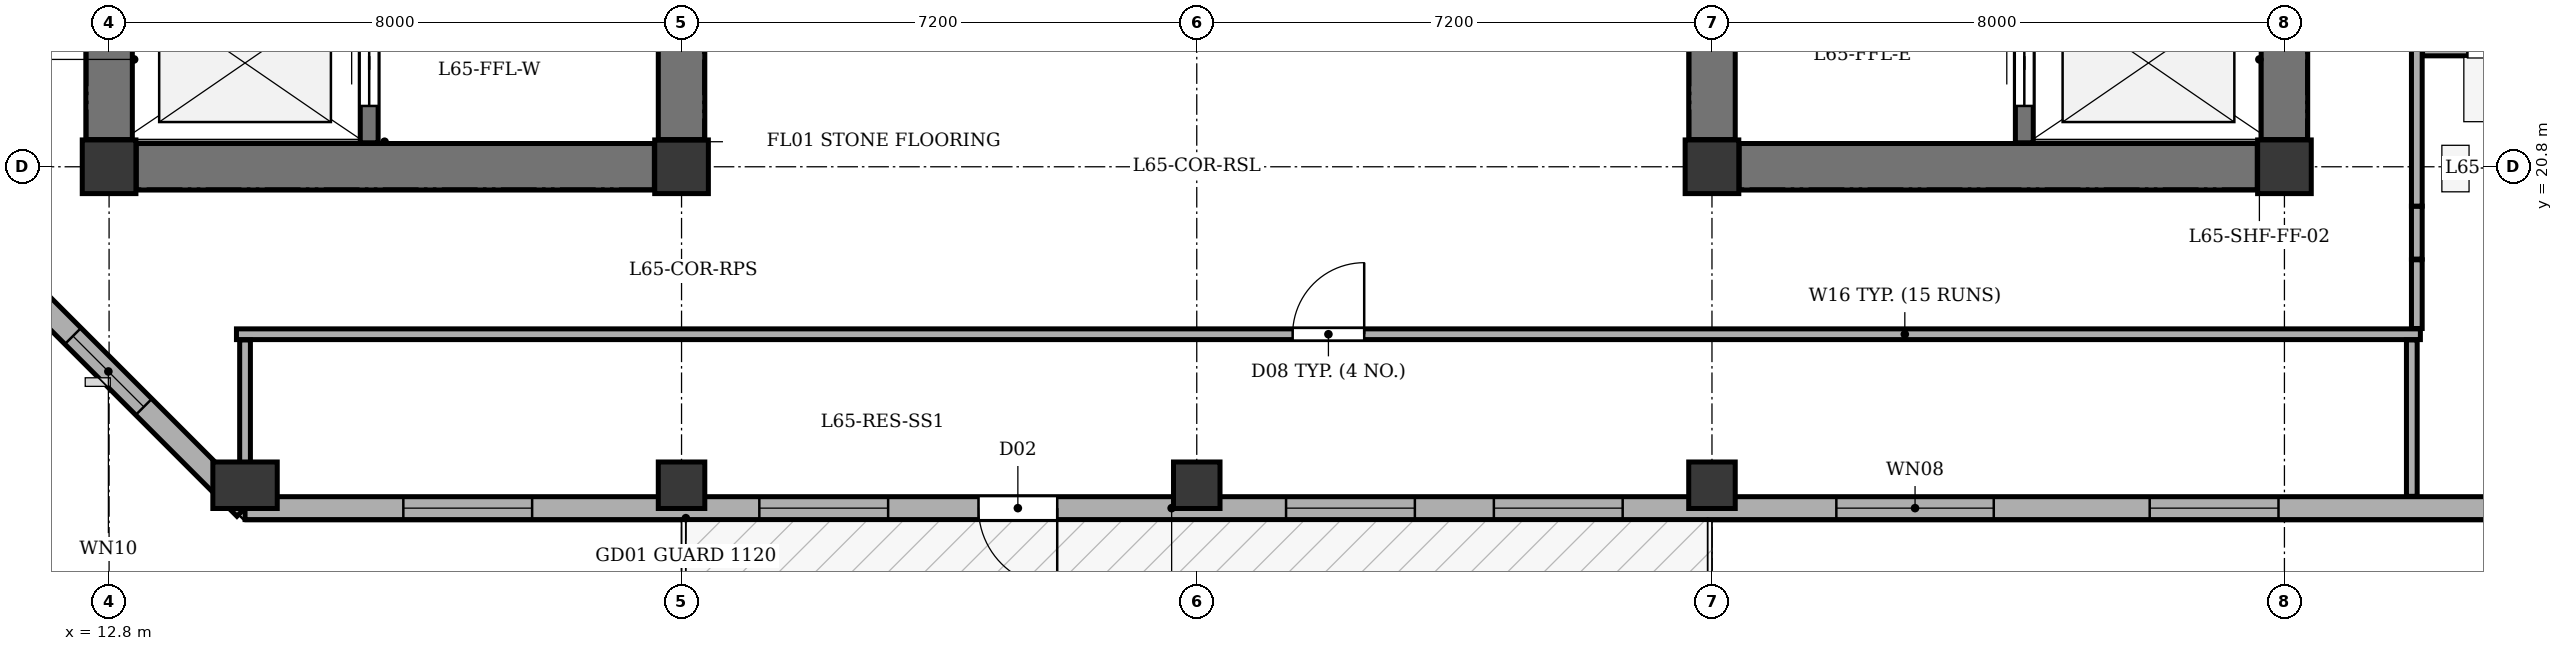
"""IFC4 building model, lengths in metres.
Left out: names, types, materials, properties, quantities, classifications, styles, units other than length and angle.
Written with IfcOpenShell. Run it as: python <this file> out.ifc"""

import sys

from ifc_helpers import new_model, si_unit, direction, frame, frame_2d, origin, origin_2d, place, context, subcontext, project, spatial, rectangle, extrude, element, fill, save


model = new_model("IFC4")
c1 = context("Model", 3, precision=1e-05, world=origin(), true_north=direction((0.0, 1.0)))
c2 = subcontext(c1, "Body", "Model", "MODEL_VIEW")
j1 = project(units=[si_unit("LENGTHUNIT", "METRE"), si_unit("PLANEANGLEUNIT", "RADIAN")], contexts=[c1])
p1 = place(None, origin())
s1 = spatial("IfcSite", under=j1, at=p1, CompositionType="ELEMENT")
p2 = place(p1, origin())
s2 = spatial("IfcBuilding", under=s1, at=p2, CompositionType="ELEMENT")
p3 = place(p2, frame((0.0, 0.0, 248.3)))
s3 = spatial("IfcBuildingStorey", under=s2, at=p3, CompositionType="ELEMENT", Elevation=248.3)
for number, where, z_axis, x_axis in (
    (1, (12.8, 20.8, 0.0), (0.0, 0.0, 1.0), (1.0, 0.0, 0.0)),
    (2, (20.8, 20.8, 0.0), (0.0, 0.0, 1.0), (1.0, 0.0, 0.0)),
    (3, (35.2, 20.8, 0.0), (0.0, 0.0, 1.0), (1.0, 0.0, 0.0)),
    (4, (43.2, 20.8, 0.0), (0.0, 0.0, 1.0), (1.0, 0.0, 0.0)),
):
    element("IfcColumn", number, at=place(p3, frame(where, z_axis=z_axis, x_axis=x_axis)), inside=s3, PredefinedType="COLUMN", context=c2, shape_type="SweptSolid", body=[
        extrude(rectangle(XDim=0.75, YDim=0.75, at=origin_2d()), origin(), (0.0, 0.0, 1.0), 3.4),
    ])
p4 = place(p3, frame((14.7, 16.35, 0.0), z_axis=(0.0, 0.0, 1.0), x_axis=(1.0, 0.0, 0.0)))
e5 = element("IfcColumn", 5, at=p4, inside=s3, PredefinedType="COLUMN", context=c2, shape_type="SweptSolid", body=[
    extrude(rectangle(XDim=0.65, YDim=0.9, at=origin_2d()), origin(), (0.0, 0.0, 1.0), 3.4),
])
for number, where, z_axis, x_axis in (
    (6, (20.8, 16.35, 0.0), (0.0, 0.0, 1.0), (1.0, 0.0, 0.0)),
    (7, (28.0, 16.35, 0.0), (0.0, 0.0, 1.0), (1.0, 0.0, 0.0)),
    (8, (35.2, 16.35, 0.0), (0.0, 0.0, 1.0), (1.0, 0.0, 0.0)),
):
    element("IfcColumn", number, at=place(p3, frame(where, z_axis=z_axis, x_axis=x_axis)), inside=s3, PredefinedType="COLUMN", context=c2, shape_type="SweptSolid", body=[
        extrude(rectangle(XDim=0.65, YDim=0.65, at=origin_2d()), origin(), (0.0, 0.0, 1.0), 3.4),
    ])
p5 = place(p3, frame((51.7, 16.03, 0.0), z_axis=(0.0, 0.0, 1.0), x_axis=(-1.0, 0.0, 0.0)))
e9 = element("IfcWall", 9, at=p5, inside=s3, PredefinedType="STANDARD", context=c2, shape_type="SweptSolid", body=[
    extrude(rectangle(XDim=37.0, YDim=0.32, at=frame_2d((18.5, 0.0))), origin(), (0.0, 0.0, 1.0), 2.725),
])
p6 = place(p5, frame((25.65, 0.0, 0.0)))
e10 = element("IfcOpeningElement", 10, at=p6, cuts=e9, PredefinedType="OPENING", context=c2, shape_type="SweptSolid", body=[
    extrude(rectangle(XDim=1.1, YDim=2.05, at=frame_2d((0.55, 1.025))), frame((0.0, 0.17, 0.0), z_axis=(0.0, -1.0, 0.0), x_axis=(1.0, 0.0, 0.0)), (0.0, 0.0, 1.0), 0.34),
])
p7 = place(p5, frame((1.235, 0.0, 0.75)))
e11 = element("IfcOpeningElement", 11, at=p7, cuts=e9, PredefinedType="OPENING", context=c2, shape_type="SweptSolid", body=[
    extrude(rectangle(XDim=1.8, YDim=1.7, at=frame_2d((0.9, 0.85))), frame((0.0, 0.17, 0.0), z_axis=(0.0, -1.0, 0.0), x_axis=(1.0, 0.0, 0.0)), (0.0, 0.0, 1.0), 0.34),
])
p8 = place(p5, frame((3.885, 0.0, 0.75)))
e12 = element("IfcOpeningElement", 12, at=p8, cuts=e9, PredefinedType="OPENING", context=c2, shape_type="SweptSolid", body=[
    extrude(rectangle(XDim=1.8, YDim=1.7, at=frame_2d((0.9, 0.85))), frame((0.0, 0.17, 0.0), z_axis=(0.0, -1.0, 0.0), x_axis=(1.0, 0.0, 0.0)), (0.0, 0.0, 1.0), 0.34),
])
p9 = place(p5, frame((8.583, 0.0, 0.75)))
e13 = element("IfcOpeningElement", 13, at=p9, cuts=e9, PredefinedType="OPENING", context=c2, shape_type="SweptSolid", body=[
    extrude(rectangle(XDim=1.8, YDim=1.7, at=frame_2d((0.9, 0.85))), frame((0.0, 0.17, 0.0), z_axis=(0.0, -1.0, 0.0), x_axis=(1.0, 0.0, 0.0)), (0.0, 0.0, 1.0), 0.34),
])
p10 = place(p5, frame((12.562, 0.0, 0.75)))
e14 = element("IfcOpeningElement", 14, at=p10, cuts=e9, PredefinedType="OPENING", context=c2, shape_type="SweptSolid", body=[
    extrude(rectangle(XDim=2.2, YDim=1.7, at=frame_2d((1.1, 0.85))), frame((0.0, 0.17, 0.0), z_axis=(0.0, -1.0, 0.0), x_axis=(1.0, 0.0, 0.0)), (0.0, 0.0, 1.0), 0.34),
])
p11 = place(p5, frame((17.748, 0.0, 0.75)))
e15 = element("IfcOpeningElement", 15, at=p11, cuts=e9, PredefinedType="OPENING", context=c2, shape_type="SweptSolid", body=[
    extrude(rectangle(XDim=1.8, YDim=1.7, at=frame_2d((0.9, 0.85))), frame((0.0, 0.17, 0.0), z_axis=(0.0, -1.0, 0.0), x_axis=(1.0, 0.0, 0.0)), (0.0, 0.0, 1.0), 0.34),
])
p12 = place(p5, frame((20.652, 0.0, 0.75)))
e16 = element("IfcOpeningElement", 16, at=p12, cuts=e9, PredefinedType="OPENING", context=c2, shape_type="SweptSolid", body=[
    extrude(rectangle(XDim=1.8, YDim=1.7, at=frame_2d((0.9, 0.85))), frame((0.0, 0.17, 0.0), z_axis=(0.0, -1.0, 0.0), x_axis=(1.0, 0.0, 0.0)), (0.0, 0.0, 1.0), 0.34),
])
p13 = place(p5, frame((28.013, 0.0, 0.75)))
e17 = element("IfcOpeningElement", 17, at=p13, cuts=e9, PredefinedType="OPENING", context=c2, shape_type="SweptSolid", body=[
    extrude(rectangle(XDim=1.8, YDim=1.7, at=frame_2d((0.9, 0.85))), frame((0.0, 0.17, 0.0), z_axis=(0.0, -1.0, 0.0), x_axis=(1.0, 0.0, 0.0)), (0.0, 0.0, 1.0), 0.34),
])
p14 = place(p5, frame((32.988, 0.0, 0.75)))
e18 = element("IfcOpeningElement", 18, at=p14, cuts=e9, PredefinedType="OPENING", context=c2, shape_type="SweptSolid", body=[
    extrude(rectangle(XDim=1.8, YDim=1.7, at=frame_2d((0.9, 0.85))), frame((0.0, 0.17, 0.0), z_axis=(0.0, -1.0, 0.0), x_axis=(1.0, 0.0, 0.0)), (0.0, 0.0, 1.0), 0.34),
])
p15 = place(p3, frame((14.7, 16.03, 0.0), z_axis=(0.0, 0.0, 1.0), x_axis=(-0.707106781187, 0.707106781187, 0.0)))
e19 = element("IfcWall", 19, at=p15, inside=s3, PredefinedType="STANDARD", context=c2, shape_type="SweptSolid", body=[
    extrude(rectangle(XDim=5.402, YDim=0.32, at=frame_2d((2.701, 0.0))), origin(), (0.0, 0.0, 1.0), 2.725),
])
p16 = place(p15, frame((2.001, 0.0, 0.75)))
e20 = element("IfcOpeningElement", 20, at=p16, cuts=e19, PredefinedType="OPENING", context=c2, shape_type="SweptSolid", body=[
    extrude(rectangle(XDim=1.4, YDim=1.65, at=frame_2d((0.7, 0.825))), frame((0.0, 0.17, 0.0), z_axis=(0.0, -1.0, 0.0), x_axis=(1.0, 0.0, 0.0)), (0.0, 0.0, 1.0), 0.34),
])
p17 = place(p3, frame((12.8, 21.18, 0.0), z_axis=(0.0, 0.0, 1.0), x_axis=(0.0, 1.0, 0.0)))
e21 = element("IfcWall", 21, at=p17, inside=s3, PredefinedType="SHEAR", context=c2, shape_type="SweptSolid", body=[
    extrude(rectangle(XDim=12.04, YDim=0.65, at=frame_2d((6.02, 0.0))), origin(), (0.0, 0.0, 1.0), 3.1),
])
p18 = place(p3, frame((13.18, 20.8, 0.0), z_axis=(0.0, 0.0, 1.0), x_axis=(1.0, 0.0, 0.0)))
e22 = element("IfcWall", 22, at=p18, inside=s3, PredefinedType="SHEAR", context=c2, shape_type="SweptSolid", body=[
    extrude(rectangle(XDim=7.24, YDim=0.65, at=frame_2d((3.62, 0.0))), origin(), (0.0, 0.0, 1.0), 3.1),
])
p19 = place(p3, frame((20.8, 21.18, 0.0), z_axis=(0.0, 0.0, 1.0), x_axis=(0.0, 1.0, 0.0)))
e23 = element("IfcWall", 23, at=p19, inside=s3, PredefinedType="SHEAR", context=c2, shape_type="SweptSolid", body=[
    extrude(rectangle(XDim=3.87, YDim=0.65, at=frame_2d((1.935, 0.0))), origin(), (0.0, 0.0, 1.0), 3.1),
])
p20 = place(p19, frame((1.42, 0.0, 0.0)))
e24 = element("IfcOpeningElement", 24, at=p20, cuts=e23, PredefinedType="OPENING", context=c2, shape_type="SweptSolid", body=[
    extrude(rectangle(XDim=1.2, YDim=2.15, at=frame_2d((0.6, 1.075))), frame((0.0, 0.335, 0.0), z_axis=(0.0, -1.0, 0.0), x_axis=(1.0, 0.0, 0.0)), (0.0, 0.0, 1.0), 0.67),
])
p21 = place(p3, frame((16.435, 21.135, 0.0), z_axis=(0.0, 0.0, 1.0), x_axis=(0.0, 1.0, 0.0)))
e25 = element("IfcWall", 25, at=p21, inside=s3, PredefinedType="SHEAR", context=c2, shape_type="SweptSolid", body=[
    extrude(rectangle(XDim=12.13, YDim=0.25, at=frame_2d((6.065, 0.0))), origin(), (0.0, 0.0, 1.0), 3.1),
])
p22 = place(p21, frame((0.515, 0.0, 0.0)))
e26 = element("IfcOpeningElement", 26, at=p22, cuts=e25, PredefinedType="OPENING", context=c2, shape_type="SweptSolid", body=[
    extrude(rectangle(XDim=1.2, YDim=2.15, at=frame_2d((0.6, 1.075))), frame((0.0, 0.135, 0.0), z_axis=(0.0, -1.0, 0.0), x_axis=(1.0, 0.0, 0.0)), (0.0, 0.0, 1.0), 0.27),
])
p23 = place(p21, frame((2.665, 0.0, 0.0)))
e27 = element("IfcOpeningElement", 27, at=p23, cuts=e25, PredefinedType="OPENING", context=c2, shape_type="SweptSolid", body=[
    extrude(rectangle(XDim=1.15, YDim=2.15, at=frame_2d((0.575, 1.075))), frame((0.0, 0.135, 0.0), z_axis=(0.0, -1.0, 0.0), x_axis=(1.0, 0.0, 0.0)), (0.0, 0.0, 1.0), 0.27),
])
p24 = place(p3, frame((43.2, 21.18, 0.0), z_axis=(0.0, 0.0, 1.0), x_axis=(0.0, 1.0, 0.0)))
e28 = element("IfcWall", 28, at=p24, inside=s3, PredefinedType="SHEAR", context=c2, shape_type="SweptSolid", body=[
    extrude(rectangle(XDim=12.04, YDim=0.65, at=frame_2d((6.02, 0.0))), origin(), (0.0, 0.0, 1.0), 3.1),
])
p25 = place(p3, frame((35.58, 20.8, 0.0), z_axis=(0.0, 0.0, 1.0), x_axis=(1.0, 0.0, 0.0)))
e29 = element("IfcWall", 29, at=p25, inside=s3, PredefinedType="SHEAR", context=c2, shape_type="SweptSolid", body=[
    extrude(rectangle(XDim=7.24, YDim=0.65, at=frame_2d((3.62, 0.0))), origin(), (0.0, 0.0, 1.0), 3.1),
])
p26 = place(p3, frame((35.2, 21.18, 0.0), z_axis=(0.0, 0.0, 1.0), x_axis=(0.0, 1.0, 0.0)))
e30 = element("IfcWall", 30, at=p26, inside=s3, PredefinedType="SHEAR", context=c2, shape_type="SweptSolid", body=[
    extrude(rectangle(XDim=3.87, YDim=0.65, at=frame_2d((1.935, 0.0))), origin(), (0.0, 0.0, 1.0), 3.1),
])
p27 = place(p26, frame((1.42, 0.0, 0.0)))
e31 = element("IfcOpeningElement", 31, at=p27, cuts=e30, PredefinedType="OPENING", context=c2, shape_type="SweptSolid", body=[
    extrude(rectangle(XDim=1.2, YDim=2.15, at=frame_2d((0.6, 1.075))), frame((0.0, 0.335, 0.0), z_axis=(0.0, -1.0, 0.0), x_axis=(1.0, 0.0, 0.0)), (0.0, 0.0, 1.0), 0.67),
])
p28 = place(p3, frame((39.565, 21.135, 0.0), z_axis=(0.0, 0.0, 1.0), x_axis=(0.0, 1.0, 0.0)))
e32 = element("IfcWall", 32, at=p28, inside=s3, PredefinedType="SHEAR", context=c2, shape_type="SweptSolid", body=[
    extrude(rectangle(XDim=12.13, YDim=0.25, at=frame_2d((6.065, 0.0))), origin(), (0.0, 0.0, 1.0), 3.1),
])
p29 = place(p28, frame((0.515, 0.0, 0.0)))
e33 = element("IfcOpeningElement", 33, at=p29, cuts=e32, PredefinedType="OPENING", context=c2, shape_type="SweptSolid", body=[
    extrude(rectangle(XDim=1.2, YDim=2.15, at=frame_2d((0.6, 1.075))), frame((0.0, 0.135, 0.0), z_axis=(0.0, -1.0, 0.0), x_axis=(1.0, 0.0, 0.0)), (0.0, 0.0, 1.0), 0.27),
])
p30 = place(p28, frame((2.665, 0.0, 0.0)))
e34 = element("IfcOpeningElement", 34, at=p30, cuts=e32, PredefinedType="OPENING", context=c2, shape_type="SweptSolid", body=[
    extrude(rectangle(XDim=1.15, YDim=2.15, at=frame_2d((0.575, 1.075))), frame((0.0, 0.135, 0.0), z_axis=(0.0, -1.0, 0.0), x_axis=(1.0, 0.0, 0.0)), (0.0, 0.0, 1.0), 0.27),
])
p31 = place(p3, frame((14.58, 18.46, 0.0), z_axis=(0.0, 0.0, 1.0), x_axis=(1.0, 0.0, 0.0)))
e35 = element("IfcWall", 35, at=p31, inside=s3, PredefinedType="PARTITIONING", context=c2, shape_type="SweptSolid", body=[
    extrude(rectangle(XDim=30.52, YDim=0.15, at=frame_2d((15.26, 0.0))), origin(), (0.0, 0.0, 1.0), 3.1),
])
p32 = place(p31, frame((14.76, 0.0, 0.0)))
e36 = element("IfcOpeningElement", 36, at=p32, cuts=e35, PredefinedType="OPENING", context=c2, shape_type="SweptSolid", body=[
    extrude(rectangle(XDim=1.0, YDim=2.1, at=frame_2d((0.5, 1.05))), frame((0.0, 0.085, 0.0), z_axis=(0.0, -1.0, 0.0), x_axis=(1.0, 0.0, 0.0)), (0.0, 0.0, 1.0), 0.17),
])
p33 = place(p3, frame((14.7, 16.195, 0.0), z_axis=(0.0, 0.0, 1.0), x_axis=(0.0, 1.0, 0.0)))
e37 = element("IfcWall", 37, at=p33, inside=s3, PredefinedType="PARTITIONING", context=c2, shape_type="SweptSolid", body=[
    extrude(rectangle(XDim=2.185, YDim=0.15, at=frame_2d((1.092, 0.0))), origin(), (0.0, 0.0, 1.0), 3.1),
])
p34 = place(p3, frame((44.98, 16.195, 0.0), z_axis=(0.0, 0.0, 1.0), x_axis=(0.0, 1.0, 0.0)))
e38 = element("IfcWall", 38, at=p34, inside=s3, PredefinedType="PARTITIONING", context=c2, shape_type="SweptSolid", body=[
    extrude(rectangle(XDim=2.185, YDim=0.15, at=frame_2d((1.092, 0.0))), origin(), (0.0, 0.0, 1.0), 2.725),
])
p35 = place(p3, frame((45.05, 19.5, 0.0), z_axis=(0.0, 0.0, 1.0), x_axis=(0.0, -1.0, 0.0)))
e39 = element("IfcWall", 39, at=p35, inside=s3, PredefinedType="PARTITIONING", context=c2, shape_type="SweptSolid", body=[
    extrude(rectangle(XDim=0.96, YDim=0.15, at=frame_2d((0.48, 0.0))), origin(), (0.0, 0.0, 1.0), 2.725),
])
p36 = place(p3, frame((45.05, 19.51, 0.0), z_axis=(0.0, 0.0, 1.0), x_axis=(0.0, 1.0, 0.0)))
e40 = element("IfcWall", 40, at=p36, inside=s3, PredefinedType="PARTITIONING", context=c2, shape_type="SweptSolid", body=[
    extrude(rectangle(XDim=0.74, YDim=0.15, at=frame_2d((0.37, 0.0))), origin(), (0.0, 0.0, 1.0), 2.725),
])
p37 = place(p3, frame((45.05, 20.25, 0.0), z_axis=(0.0, 0.0, 1.0), x_axis=(0.0, 1.0, 0.0)))
e41 = element("IfcWall", 41, at=p37, inside=s3, PredefinedType="PARTITIONING", context=c2, shape_type="SweptSolid", body=[
    extrude(rectangle(XDim=13.9, YDim=0.15, at=frame_2d((6.95, 0.0))), origin(), (0.0, 0.0, 1.0), 2.725),
])
p38 = place(p3, frame((45.13, 22.4, 0.0), z_axis=(0.0, 0.0, 1.0), x_axis=(1.0, 0.0, 0.0)))
e42 = element("IfcWall", 42, at=p38, inside=s3, PredefinedType="PARTITIONING", context=c2, shape_type="SweptSolid", body=[
    extrude(rectangle(XDim=10.225, YDim=0.1, at=frame_2d((5.113, 0.0))), origin(), (0.0, 0.0, 1.0), 3.1),
])
p39 = place(p38, frame((0.627, 0.0, 0.0)))
e43 = element("IfcOpeningElement", 43, at=p39, cuts=e42, PredefinedType="OPENING", context=c2, shape_type="SweptSolid", body=[
    extrude(rectangle(XDim=0.85, YDim=2.05, at=frame_2d((0.425, 1.025))), frame((0.0, 0.06, 0.0), z_axis=(0.0, -1.0, 0.0), x_axis=(1.0, 0.0, 0.0)), (0.0, 0.0, 1.0), 0.12),
])
p40 = place(p38, frame((2.798, 0.0, 0.0)))
e44 = element("IfcOpeningElement", 44, at=p40, cuts=e42, PredefinedType="OPENING", context=c2, shape_type="SweptSolid", body=[
    extrude(rectangle(XDim=0.85, YDim=2.05, at=frame_2d((0.425, 1.025))), frame((0.0, 0.06, 0.0), z_axis=(0.0, -1.0, 0.0), x_axis=(1.0, 0.0, 0.0)), (0.0, 0.0, 1.0), 0.12),
])
p41 = place(p38, frame((5.314, 0.0, 0.0)))
e45 = element("IfcOpeningElement", 45, at=p41, cuts=e42, PredefinedType="OPENING", context=c2, shape_type="SweptSolid", body=[
    extrude(rectangle(XDim=0.9, YDim=2.05, at=frame_2d((0.45, 1.025))), frame((0.0, 0.06, 0.0), z_axis=(0.0, -1.0, 0.0), x_axis=(1.0, 0.0, 0.0)), (0.0, 0.0, 1.0), 0.12),
])
p42 = place(p38, frame((8.138, 0.0, 0.0)))
e46 = element("IfcOpeningElement", 46, at=p42, cuts=e42, PredefinedType="OPENING", context=c2, shape_type="SweptSolid", body=[
    extrude(rectangle(XDim=0.9, YDim=2.05, at=frame_2d((0.45, 1.025))), frame((0.0, 0.06, 0.0), z_axis=(0.0, -1.0, 0.0), x_axis=(1.0, 0.0, 0.0)), (0.0, 0.0, 1.0), 0.12),
])
p43 = place(p6, origin())
e47 = element("IfcDoor", 47, at=p43, inside=s3, OperationType="SINGLE_SWING_LEFT", PredefinedType="DOOR", context=c2, shape_type="SweptSolid", body=[
    extrude(rectangle(XDim=1.1, YDim=2.05, at=frame_2d((0.55, 1.025))), frame((0.0, 0.025, 0.0), z_axis=(0.0, -1.0, 0.0), x_axis=(1.0, 0.0, 0.0)), (0.0, 0.0, 1.0), 0.05),
])
fill(e10, e47)
p44 = place(p9, origin())
e48 = element("IfcWindow", 48, at=p44, inside=s3, PartitioningType="SINGLE_PANEL", PredefinedType="WINDOW", context=c2, shape_type="SweptSolid", body=[
    extrude(rectangle(XDim=1.8, YDim=1.7, at=frame_2d((0.9, 0.85))), frame((0.0, -0.01, 0.0), z_axis=(0.0, -1.0, 0.0), x_axis=(1.0, 0.0, 0.0)), (0.0, 0.0, 1.0), 0.06),
])
fill(e13, e48)
p45 = place(p10, origin())
e49 = element("IfcWindow", 49, at=p45, inside=s3, PartitioningType="SINGLE_PANEL", PredefinedType="WINDOW", context=c2, shape_type="SweptSolid", body=[
    extrude(rectangle(XDim=2.2, YDim=1.7, at=frame_2d((1.1, 0.85))), frame((0.0, -0.01, 0.0), z_axis=(0.0, -1.0, 0.0), x_axis=(1.0, 0.0, 0.0)), (0.0, 0.0, 1.0), 0.06),
])
fill(e14, e49)
p46 = place(p11, origin())
e50 = element("IfcWindow", 50, at=p46, inside=s3, PartitioningType="SINGLE_PANEL", PredefinedType="WINDOW", context=c2, shape_type="SweptSolid", body=[
    extrude(rectangle(XDim=1.8, YDim=1.7, at=frame_2d((0.9, 0.85))), frame((0.0, -0.01, 0.0), z_axis=(0.0, -1.0, 0.0), x_axis=(1.0, 0.0, 0.0)), (0.0, 0.0, 1.0), 0.06),
])
fill(e15, e50)
p47 = place(p12, origin())
e51 = element("IfcWindow", 51, at=p47, inside=s3, PartitioningType="SINGLE_PANEL", PredefinedType="WINDOW", context=c2, shape_type="SweptSolid", body=[
    extrude(rectangle(XDim=1.8, YDim=1.7, at=frame_2d((0.9, 0.85))), frame((0.0, -0.01, 0.0), z_axis=(0.0, -1.0, 0.0), x_axis=(1.0, 0.0, 0.0)), (0.0, 0.0, 1.0), 0.06),
])
fill(e16, e51)
p48 = place(p13, origin())
e52 = element("IfcWindow", 52, at=p48, inside=s3, PartitioningType="SINGLE_PANEL", PredefinedType="WINDOW", context=c2, shape_type="SweptSolid", body=[
    extrude(rectangle(XDim=1.8, YDim=1.7, at=frame_2d((0.9, 0.85))), frame((0.0, -0.01, 0.0), z_axis=(0.0, -1.0, 0.0), x_axis=(1.0, 0.0, 0.0)), (0.0, 0.0, 1.0), 0.06),
])
fill(e17, e52)
p49 = place(p14, origin())
e53 = element("IfcWindow", 53, at=p49, inside=s3, PartitioningType="SINGLE_PANEL", PredefinedType="WINDOW", context=c2, shape_type="SweptSolid", body=[
    extrude(rectangle(XDim=1.8, YDim=1.7, at=frame_2d((0.9, 0.85))), frame((0.0, -0.01, 0.0), z_axis=(0.0, -1.0, 0.0), x_axis=(1.0, 0.0, 0.0)), (0.0, 0.0, 1.0), 0.06),
])
fill(e18, e53)
p50 = place(p16, origin())
e54 = element("IfcWindow", 54, at=p50, inside=s3, PartitioningType="SINGLE_PANEL", PredefinedType="WINDOW", context=c2, shape_type="SweptSolid", body=[
    extrude(rectangle(XDim=1.4, YDim=1.65, at=frame_2d((0.7, 0.825))), frame((0.0, -0.01, 0.0), z_axis=(0.0, -1.0, 0.0), x_axis=(1.0, 0.0, 0.0)), (0.0, 0.0, 1.0), 0.06),
])
fill(e20, e54)
p51 = place(p22, origin())
e55 = element("IfcDoor", 55, at=p51, inside=s3, OperationType="DOUBLE_DOOR_SLIDING", PredefinedType="DOOR", context=c2, shape_type="SweptSolid", body=[
    extrude(rectangle(XDim=1.2, YDim=2.15, at=frame_2d((0.6, 1.075))), frame((0.0, 0.025, 0.0), z_axis=(0.0, -1.0, 0.0), x_axis=(1.0, 0.0, 0.0)), (0.0, 0.0, 1.0), 0.05),
])
fill(e26, e55)
p52 = place(p29, origin())
e56 = element("IfcDoor", 56, at=p52, inside=s3, OperationType="DOUBLE_DOOR_SLIDING", PredefinedType="DOOR", context=c2, shape_type="SweptSolid", body=[
    extrude(rectangle(XDim=1.2, YDim=2.15, at=frame_2d((0.6, 1.075))), frame((0.0, 0.025, 0.0), z_axis=(0.0, -1.0, 0.0), x_axis=(1.0, 0.0, 0.0)), (0.0, 0.0, 1.0), 0.05),
])
fill(e33, e56)
p53 = place(p32, origin())
e57 = element("IfcDoor", 57, at=p53, inside=s3, OperationType="SINGLE_SWING_RIGHT", PredefinedType="DOOR", context=c2, shape_type="SweptSolid", body=[
    extrude(rectangle(XDim=1.0, YDim=2.1, at=frame_2d((0.5, 1.05))), frame((0.0, 0.025, 0.0), z_axis=(0.0, -1.0, 0.0), x_axis=(1.0, 0.0, 0.0)), (0.0, 0.0, 1.0), 0.05),
])
fill(e36, e57)
p54 = place(p39, origin())
e58 = element("IfcDoor", 58, at=p54, inside=s3, OperationType="SINGLE_SWING_LEFT", PredefinedType="DOOR", context=c2, shape_type="SweptSolid", body=[
    extrude(rectangle(XDim=0.85, YDim=2.05, at=frame_2d((0.425, 1.025))), frame((0.0, 0.025, 0.0), z_axis=(0.0, -1.0, 0.0), x_axis=(1.0, 0.0, 0.0)), (0.0, 0.0, 1.0), 0.05),
])
fill(e43, e58)
save(model, sys.argv[1])
